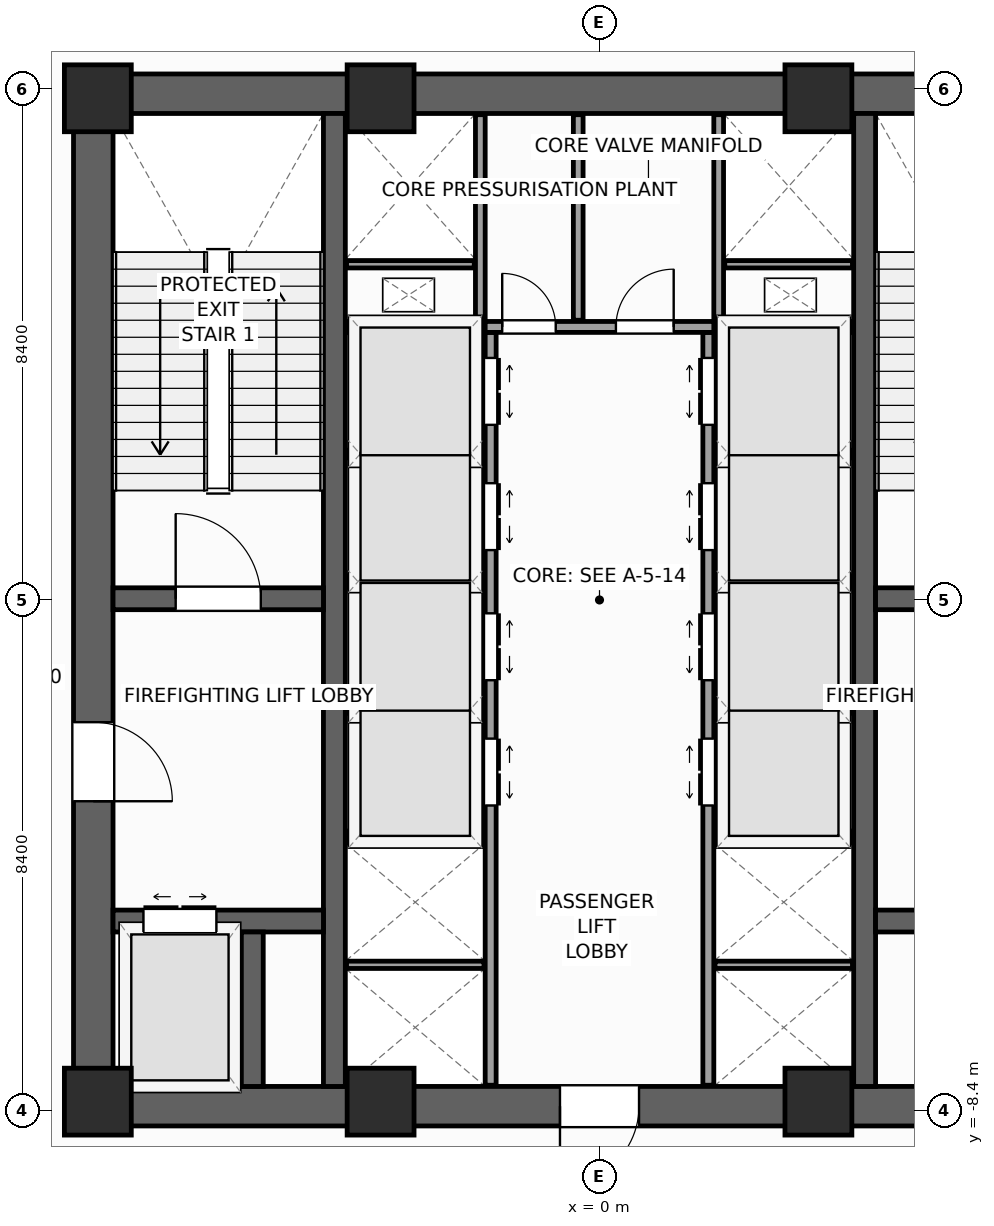
"""IFC4 building model, lengths in metres.
Left out: names, types, materials, properties, quantities, classifications, styles, units other than length and angle.
Written with IfcOpenShell. Run it as: python <this file> out.ifc"""

import sys

from ifc_helpers import new_model, si_unit, direction, frame, frame_2d, origin, origin_2d, place, context, subcontext, project, spatial, rectangle, extrude, source, transform, mapped, element, fill, save


model = new_model("IFC4")
c1 = context("Model", 3, precision=1e-05, world=origin(), true_north=direction((0.0, 1.0)))
c2 = subcontext(c1, "Body", "Model", "MODEL_VIEW")
j1 = project(units=[si_unit("LENGTHUNIT", "METRE"), si_unit("PLANEANGLEUNIT", "RADIAN")], contexts=[c1])
p1 = place(None, origin())
s1 = spatial("IfcSite", under=j1, at=p1, CompositionType="ELEMENT")
p2 = place(p1, origin())
s2 = spatial("IfcBuilding", under=s1, at=p2, CompositionType="ELEMENT")
p3 = place(p2, frame((0.0, 0.0, 139.2)))
s3 = spatial("IfcBuildingStorey", under=s2, at=p3, CompositionType="ELEMENT", Elevation=139.2)
p4 = place(p3, frame((-8.65, -8.325, 0.0), z_axis=(0.0, 0.0, 1.0), x_axis=(1.0, 0.0, 0.0)))
e1 = element("IfcWall", 1, at=p4, inside=s3, PredefinedType="SHEAR", context=c2, shape_type="SweptSolid", body=[
    extrude(rectangle(XDim=17.3, YDim=0.65, at=frame_2d((8.65, 0.0))), origin(), (0.0, 0.0, 1.0), 5.2),
])
p5 = place(p4, frame((8.0, 0.0, 0.0)))
e2 = element("IfcOpeningElement", 2, at=p5, cuts=e1, PredefinedType="OPENING", context=c2, shape_type="SweptSolid", body=[
    extrude(rectangle(XDim=1.3, YDim=2.2, at=frame_2d((0.65, 1.1))), frame((0.0, 0.335, 0.0), z_axis=(0.0, -1.0, 0.0), x_axis=(1.0, 0.0, 0.0)), (0.0, 0.0, 1.0), 0.67),
])
p6 = place(p3, frame((-8.65, 8.325, 0.0), z_axis=(0.0, 0.0, 1.0), x_axis=(1.0, 0.0, 0.0)))
e3 = element("IfcWall", 3, at=p6, inside=s3, PredefinedType="SHEAR", context=c2, shape_type="SweptSolid", body=[
    extrude(rectangle(XDim=17.3, YDim=0.65, at=frame_2d((8.65, 0.0))), origin(), (0.0, 0.0, 1.0), 5.2),
])
p7 = place(p3, frame((-8.325, -8.0, 0.0), z_axis=(0.0, 0.0, 1.0), x_axis=(0.0, 1.0, 0.0)))
e4 = element("IfcWall", 4, at=p7, inside=s3, PredefinedType="SHEAR", context=c2, shape_type="SweptSolid", body=[
    extrude(rectangle(XDim=16.0, YDim=0.65, at=frame_2d((8.0, 0.0))), origin(), (0.0, 0.0, 1.0), 5.2),
])
p8 = place(p7, frame((4.69, 0.0, 0.0)))
e5 = element("IfcOpeningElement", 5, at=p8, cuts=e4, PredefinedType="OPENING", context=c2, shape_type="SweptSolid", body=[
    extrude(rectangle(XDim=1.3, YDim=2.2, at=frame_2d((0.65, 1.1))), frame((0.0, 0.335, 0.0), z_axis=(0.0, -1.0, 0.0), x_axis=(1.0, 0.0, 0.0)), (0.0, 0.0, 1.0), 0.67),
])
for number, where, z_axis, x_axis in (
    (6, (-4.36, -8.0, 0.0), (0.0, 0.0, 1.0), (0.0, 1.0, 0.0)),
    (7, (4.36, -8.0, 0.0), (0.0, 0.0, 1.0), (0.0, 1.0, 0.0)),
):
    element("IfcWall", number, at=place(p3, frame(where, z_axis=z_axis, x_axis=x_axis)), inside=s3, PredefinedType="SHEAR", context=c2, shape_type="SweptSolid", body=[
        extrude(rectangle(XDim=16.0, YDim=0.36, at=frame_2d((8.0, 0.0))), origin(), (0.0, 0.0, 1.0), 5.2),
    ])
p9 = place(p3, frame((-8.0, 0.02, 0.0), z_axis=(0.0, 0.0, 1.0), x_axis=(1.0, 0.0, 0.0)))
e8 = element("IfcWall", 8, at=p9, inside=s3, PredefinedType="SHEAR", context=c2, shape_type="SweptSolid", body=[
    extrude(rectangle(XDim=3.46, YDim=0.36, at=frame_2d((1.73, 0.0))), origin(), (0.0, 0.0, 1.0), 5.2),
])
p10 = place(p9, frame((1.03, 0.0, 0.0)))
e9 = element("IfcOpeningElement", 9, at=p10, cuts=e8, PredefinedType="OPENING", context=c2, shape_type="SweptSolid", body=[
    extrude(rectangle(XDim=1.4, YDim=2.2, at=frame_2d((0.7, 1.1))), frame((0.0, 0.19, 0.0), z_axis=(0.0, -1.0, 0.0), x_axis=(1.0, 0.0, 0.0)), (0.0, 0.0, 1.0), 0.38),
])
p11 = place(p3, frame((4.54, 0.02, 0.0), z_axis=(0.0, 0.0, 1.0), x_axis=(1.0, 0.0, 0.0)))
e10 = element("IfcWall", 10, at=p11, inside=s3, PredefinedType="SHEAR", context=c2, shape_type="SweptSolid", body=[
    extrude(rectangle(XDim=3.46, YDim=0.36, at=frame_2d((1.73, 0.0))), origin(), (0.0, 0.0, 1.0), 5.2),
])
p12 = place(p11, frame((1.03, 0.0, 0.0)))
e11 = element("IfcOpeningElement", 11, at=p12, cuts=e10, PredefinedType="OPENING", context=c2, shape_type="SweptSolid", body=[
    extrude(rectangle(XDim=1.4, YDim=2.2, at=frame_2d((0.7, 1.1))), frame((0.0, 0.19, 0.0), z_axis=(0.0, -1.0, 0.0), x_axis=(1.0, 0.0, 0.0)), (0.0, 0.0, 1.0), 0.38),
])
p13 = place(p3, frame((-8.0, -5.28, 0.0), z_axis=(0.0, 0.0, 1.0), x_axis=(1.0, 0.0, 0.0)))
e12 = element("IfcWall", 12, at=p13, inside=s3, PredefinedType="SHEAR", context=c2, shape_type="SweptSolid", body=[
    extrude(rectangle(XDim=3.46, YDim=0.36, at=frame_2d((1.73, 0.0))), origin(), (0.0, 0.0, 1.0), 5.2),
])
p14 = place(p13, frame((0.5, 0.0, 0.0)))
e13 = element("IfcOpeningElement", 13, at=p14, cuts=e12, PredefinedType="OPENING", context=c2, shape_type="SweptSolid", body=[
    extrude(rectangle(XDim=1.2, YDim=2.25, at=frame_2d((0.6, 1.125))), frame((0.0, 0.19, 0.0), z_axis=(0.0, -1.0, 0.0), x_axis=(1.0, 0.0, 0.0)), (0.0, 0.0, 1.0), 0.38),
])
p15 = place(p3, frame((4.54, -5.28, 0.0), z_axis=(0.0, 0.0, 1.0), x_axis=(1.0, 0.0, 0.0)))
e14 = element("IfcWall", 14, at=p15, inside=s3, PredefinedType="SHEAR", context=c2, shape_type="SweptSolid", body=[
    extrude(rectangle(XDim=3.46, YDim=0.36, at=frame_2d((1.73, 0.0))), origin(), (0.0, 0.0, 1.0), 5.2),
])
p16 = place(p15, frame((1.76, 0.0, 0.0)))
e15 = element("IfcOpeningElement", 15, at=p16, cuts=e14, PredefinedType="OPENING", context=c2, shape_type="SweptSolid", body=[
    extrude(rectangle(XDim=1.2, YDim=2.25, at=frame_2d((0.6, 1.125))), frame((0.0, 0.19, 0.0), z_axis=(0.0, -1.0, 0.0), x_axis=(1.0, 0.0, 0.0)), (0.0, 0.0, 1.0), 0.38),
])
p17 = place(p3, frame((-5.71, -8.0, 0.0), z_axis=(0.0, 0.0, 1.0), x_axis=(0.0, 1.0, 0.0)))
e16 = element("IfcWall", 16, at=p17, inside=s3, PredefinedType="SHEAR", context=c2, shape_type="SweptSolid", body=[
    extrude(rectangle(XDim=2.54, YDim=0.36, at=frame_2d((1.27, 0.0))), origin(), (0.0, 0.0, 1.0), 5.2),
])
m1 = source(origin(), c2, "Body", "SweptSolid", [
    extrude(rectangle(XDim=1.1, YDim=1.1, at=origin_2d()), origin(), (0.0, 0.0, 1.0), 5.2),
])
for number, where, z_axis, x_axis in (
    (17, (-8.25, -8.25, 0.0), (0.0, 0.0, 1.0), (1.0, 0.0, 0.0)),
    (18, (-8.25, 8.25, 0.0), (0.0, 0.0, 1.0), (1.0, 0.0, 0.0)),
    (19, (-3.6, -8.25, 0.0), (0.0, 0.0, 1.0), (1.0, 0.0, 0.0)),
    (20, (3.6, -8.25, 0.0), (0.0, 0.0, 1.0), (1.0, 0.0, 0.0)),
    (21, (-3.6, 8.25, 0.0), (0.0, 0.0, 1.0), (1.0, 0.0, 0.0)),
    (22, (3.6, 8.25, 0.0), (0.0, 0.0, 1.0), (1.0, 0.0, 0.0)),
):
    element("IfcColumn", number, at=place(p3, frame(where, z_axis=z_axis, x_axis=x_axis)), inside=s3, PredefinedType="PILASTER", context=c2, shape_type="MappedRepresentation", body=[
        mapped(m1, transform((0.0, 0.0, 0.0), scale=1.0)),
    ])
p18 = place(p3, frame((-1.79, -7.98, 0.0), z_axis=(0.0, 0.0, 1.0), x_axis=(0.0, 1.0, 0.0)))
e23 = element("IfcWall", 23, at=p18, inside=s3, PredefinedType="PARTITIONING", context=c2, shape_type="SweptSolid", body=[
    extrude(rectangle(XDim=12.38, YDim=0.18, at=frame_2d((6.19, 0.0))), origin(), (0.0, 0.0, 1.0), 4.94),
])
p19 = place(p18, frame((4.6, 0.0, 0.0)))
e24 = element("IfcOpeningElement", 24, at=p19, cuts=e23, PredefinedType="OPENING", context=c2, shape_type="SweptSolid", body=[
    extrude(rectangle(XDim=1.1, YDim=2.2, at=frame_2d((0.55, 1.1))), frame((0.0, 0.1, 0.0), z_axis=(0.0, -1.0, 0.0), x_axis=(1.0, 0.0, 0.0)), (0.0, 0.0, 1.0), 0.2),
])
p20 = place(p18, frame((6.66, 0.0, 0.0)))
e25 = element("IfcOpeningElement", 25, at=p20, cuts=e23, PredefinedType="OPENING", context=c2, shape_type="SweptSolid", body=[
    extrude(rectangle(XDim=1.1, YDim=2.2, at=frame_2d((0.55, 1.1))), frame((0.0, 0.1, 0.0), z_axis=(0.0, -1.0, 0.0), x_axis=(1.0, 0.0, 0.0)), (0.0, 0.0, 1.0), 0.2),
])
p21 = place(p18, frame((8.8, 0.0, 0.0)))
e26 = element("IfcOpeningElement", 26, at=p21, cuts=e23, PredefinedType="OPENING", context=c2, shape_type="SweptSolid", body=[
    extrude(rectangle(XDim=1.1, YDim=2.2, at=frame_2d((0.55, 1.1))), frame((0.0, 0.1, 0.0), z_axis=(0.0, -1.0, 0.0), x_axis=(1.0, 0.0, 0.0)), (0.0, 0.0, 1.0), 0.2),
])
p22 = place(p18, frame((10.86, 0.0, 0.0)))
e27 = element("IfcOpeningElement", 27, at=p22, cuts=e23, PredefinedType="OPENING", context=c2, shape_type="SweptSolid", body=[
    extrude(rectangle(XDim=1.1, YDim=2.2, at=frame_2d((0.55, 1.1))), frame((0.0, 0.1, 0.0), z_axis=(0.0, -1.0, 0.0), x_axis=(1.0, 0.0, 0.0)), (0.0, 0.0, 1.0), 0.2),
])
p23 = place(p3, frame((1.79, -7.98, 0.0), z_axis=(0.0, 0.0, 1.0), x_axis=(0.0, 1.0, 0.0)))
e28 = element("IfcWall", 28, at=p23, inside=s3, PredefinedType="PARTITIONING", context=c2, shape_type="SweptSolid", body=[
    extrude(rectangle(XDim=12.38, YDim=0.18, at=frame_2d((6.19, 0.0))), origin(), (0.0, 0.0, 1.0), 4.94),
])
p24 = place(p23, frame((4.6, 0.0, 0.0)))
e29 = element("IfcOpeningElement", 29, at=p24, cuts=e28, PredefinedType="OPENING", context=c2, shape_type="SweptSolid", body=[
    extrude(rectangle(XDim=1.1, YDim=2.2, at=frame_2d((0.55, 1.1))), frame((0.0, 0.1, 0.0), z_axis=(0.0, -1.0, 0.0), x_axis=(1.0, 0.0, 0.0)), (0.0, 0.0, 1.0), 0.2),
])
p25 = place(p23, frame((6.66, 0.0, 0.0)))
e30 = element("IfcOpeningElement", 30, at=p25, cuts=e28, PredefinedType="OPENING", context=c2, shape_type="SweptSolid", body=[
    extrude(rectangle(XDim=1.1, YDim=2.2, at=frame_2d((0.55, 1.1))), frame((0.0, 0.1, 0.0), z_axis=(0.0, -1.0, 0.0), x_axis=(1.0, 0.0, 0.0)), (0.0, 0.0, 1.0), 0.2),
])
p26 = place(p23, frame((8.8, 0.0, 0.0)))
e31 = element("IfcOpeningElement", 31, at=p26, cuts=e28, PredefinedType="OPENING", context=c2, shape_type="SweptSolid", body=[
    extrude(rectangle(XDim=1.1, YDim=2.2, at=frame_2d((0.55, 1.1))), frame((0.0, 0.1, 0.0), z_axis=(0.0, -1.0, 0.0), x_axis=(1.0, 0.0, 0.0)), (0.0, 0.0, 1.0), 0.2),
])
p27 = place(p23, frame((10.86, 0.0, 0.0)))
e32 = element("IfcOpeningElement", 32, at=p27, cuts=e28, PredefinedType="OPENING", context=c2, shape_type="SweptSolid", body=[
    extrude(rectangle(XDim=1.1, YDim=2.2, at=frame_2d((0.55, 1.1))), frame((0.0, 0.1, 0.0), z_axis=(0.0, -1.0, 0.0), x_axis=(1.0, 0.0, 0.0)), (0.0, 0.0, 1.0), 0.2),
])
p28 = place(p3, frame((-1.88, 4.49, 0.0), z_axis=(0.0, 0.0, 1.0), x_axis=(1.0, 0.0, 0.0)))
e33 = element("IfcWall", 33, at=p28, inside=s3, PredefinedType="PARTITIONING", context=c2, shape_type="SweptSolid", body=[
    extrude(rectangle(XDim=3.76, YDim=0.18, at=frame_2d((1.88, 0.0))), origin(), (0.0, 0.0, 1.0), 4.94),
])
p29 = place(p28, frame((0.28, 0.0, 0.0)))
e34 = element("IfcOpeningElement", 34, at=p29, cuts=e33, PredefinedType="OPENING", context=c2, shape_type="SweptSolid", body=[
    extrude(rectangle(XDim=0.88, YDim=2.1, at=frame_2d((0.44, 1.05))), frame((0.0, 0.1, 0.0), z_axis=(0.0, -1.0, 0.0), x_axis=(1.0, 0.0, 0.0)), (0.0, 0.0, 1.0), 0.2),
])
p30 = place(p28, frame((2.15, 0.0, 0.0)))
e35 = element("IfcOpeningElement", 35, at=p30, cuts=e33, PredefinedType="OPENING", context=c2, shape_type="SweptSolid", body=[
    extrude(rectangle(XDim=0.95, YDim=2.1, at=frame_2d((0.475, 1.05))), frame((0.0, 0.1, 0.0), z_axis=(0.0, -1.0, 0.0), x_axis=(1.0, 0.0, 0.0)), (0.0, 0.0, 1.0), 0.2),
])
for number, where, z_axis, x_axis in (
    (36, (-4.17, -3.9, 0.0), (0.0, 0.0, 1.0), (1.0, 0.0, 0.0)),
    (37, (1.89, -3.9, 0.0), (0.0, 0.0, 1.0), (1.0, 0.0, 0.0)),
    (38, (-4.17, 0.3, 0.0), (0.0, 0.0, 1.0), (1.0, 0.0, 0.0)),
    (39, (1.89, 0.3, 0.0), (0.0, 0.0, 1.0), (1.0, 0.0, 0.0)),
    (40, (-4.17, 4.49, 0.0), (0.0, 0.0, 1.0), (1.0, 0.0, 0.0)),
    (41, (1.89, 4.49, 0.0), (0.0, 0.0, 1.0), (1.0, 0.0, 0.0)),
):
    element("IfcWall", number, at=place(p3, frame(where, z_axis=z_axis, x_axis=x_axis)), inside=s3, PredefinedType="PARTITIONING", context=c2, shape_type="SweptSolid", body=[
        extrude(rectangle(XDim=2.28, YDim=0.18, at=frame_2d((1.14, 0.0))), origin(), (0.0, 0.0, 1.0), 4.94),
    ])
for number, where, z_axis, x_axis in (
    (42, (-4.16, -6.0, 0.0), (0.0, 0.0, 1.0), (1.0, 0.0, 0.0)),
    (43, (1.9, -6.0, 0.0), (0.0, 0.0, 1.0), (1.0, 0.0, 0.0)),
    (44, (-4.16, -1.8, 0.0), (0.0, 0.0, 1.0), (1.0, 0.0, 0.0)),
    (45, (1.9, -1.8, 0.0), (0.0, 0.0, 1.0), (1.0, 0.0, 0.0)),
    (46, (-4.16, 2.4, 0.0), (0.0, 0.0, 1.0), (1.0, 0.0, 0.0)),
    (47, (1.9, 2.4, 0.0), (0.0, 0.0, 1.0), (1.0, 0.0, 0.0)),
):
    element("IfcWall", number, at=place(p3, frame(where, z_axis=z_axis, x_axis=x_axis)), inside=s3, PredefinedType="PARTITIONING", context=c2, shape_type="SweptSolid", body=[
        extrude(rectangle(XDim=2.26, YDim=0.12, at=frame_2d((1.13, 0.0))), origin(), (0.0, 0.0, 1.0), 4.94),
    ])
for number, where, z_axis, x_axis in (
    (48, (-1.96, 4.58, 0.0), (0.0, 0.0, 1.0), (0.0, 1.0, 0.0)),
    (49, (1.96, 4.58, 0.0), (0.0, 0.0, 1.0), (0.0, 1.0, 0.0)),
):
    element("IfcWall", number, at=place(p3, frame(where, z_axis=z_axis, x_axis=x_axis)), inside=s3, PredefinedType="PARTITIONING", context=c2, shape_type="SweptSolid", body=[
        extrude(rectangle(XDim=3.4, YDim=0.16, at=frame_2d((1.7, 0.0))), origin(), (0.0, 0.0, 1.0), 4.94),
    ])
for number, where, z_axis, x_axis in (
    (50, (-4.16, 5.52, 0.0), (0.0, 0.0, 1.0), (1.0, 0.0, 0.0)),
    (51, (2.06, 5.52, 0.0), (0.0, 0.0, 1.0), (1.0, 0.0, 0.0)),
):
    element("IfcWall", number, at=place(p3, frame(where, z_axis=z_axis, x_axis=x_axis)), inside=s3, PredefinedType="PARTITIONING", context=c2, shape_type="SweptSolid", body=[
        extrude(rectangle(XDim=2.1, YDim=0.12, at=frame_2d((1.05, 0.0))), origin(), (0.0, 0.0, 1.0), 4.94),
    ])
p31 = place(p3, frame((-0.35, 4.6, 0.0), z_axis=(0.0, 0.0, 1.0), x_axis=(0.0, 1.0, 0.0)))
e52 = element("IfcWall", 52, at=p31, inside=s3, PredefinedType="PARTITIONING", context=c2, shape_type="SweptSolid", body=[
    extrude(rectangle(XDim=3.38, YDim=0.16, at=frame_2d((1.69, 0.0))), origin(), (0.0, 0.0, 1.0), 4.94),
])
m2 = source(origin(), c2, "Body", "SweptSolid", [
    extrude(rectangle(XDim=1.4, YDim=2.2, at=frame_2d((0.7, 1.1))), frame((0.0, 0.025, 0.0), z_axis=(0.0, -1.0, 0.0), x_axis=(1.0, 0.0, 0.0)), (0.0, 0.0, 1.0), 0.05),
])
p32 = place(p10, origin())
e53 = element("IfcDoor", 53, at=p32, inside=s3, OperationType="SINGLE_SWING_LEFT", PredefinedType="DOOR", context=c2, shape_type="MappedRepresentation", body=[
    mapped(m2, transform((0.0, 0.0, 0.0), scale=1.0)),
])
fill(e9, e53)
m3 = source(origin(), c2, "Body", "SweptSolid", [
    extrude(rectangle(XDim=1.3, YDim=2.2, at=frame_2d((0.65, 1.1))), frame((0.0, 0.025, 0.0), z_axis=(0.0, -1.0, 0.0), x_axis=(1.0, 0.0, 0.0)), (0.0, 0.0, 1.0), 0.05),
])
p33 = place(p8, frame((1.3, 0.0, 0.0), z_axis=(0.0, 0.0, 1.0), x_axis=(-1.0, 0.0, 0.0)))
e54 = element("IfcDoor", 54, at=p33, inside=s3, OperationType="SINGLE_SWING_LEFT", PredefinedType="DOOR", context=c2, shape_type="MappedRepresentation", body=[
    mapped(m3, transform((0.0, 0.0, 0.0), scale=1.0)),
])
fill(e5, e54)
p34 = place(p5, frame((1.3, 0.0, 0.0), z_axis=(0.0, 0.0, 1.0), x_axis=(-1.0, 0.0, 0.0)))
e55 = element("IfcDoor", 55, at=p34, inside=s3, OperationType="SINGLE_SWING_LEFT", PredefinedType="DOOR", context=c2, shape_type="MappedRepresentation", body=[
    mapped(m3, transform((0.0, 0.0, 0.0), scale=1.0)),
])
fill(e2, e55)
m4 = source(origin(), c2, "Body", "SweptSolid", [
    extrude(rectangle(XDim=1.2, YDim=2.25, at=frame_2d((0.6, 1.125))), frame((0.0, 0.025, 0.0), z_axis=(0.0, -1.0, 0.0), x_axis=(1.0, 0.0, 0.0)), (0.0, 0.0, 1.0), 0.05),
])
p35 = place(p14, origin())
e56 = element("IfcDoor", 56, at=p35, inside=s3, OperationType="DOUBLE_DOOR_SLIDING", PredefinedType="DOOR", context=c2, shape_type="MappedRepresentation", body=[
    mapped(m4, transform((0.0, 0.0, 0.0), scale=1.0)),
])
fill(e13, e56)
m5 = source(origin(), c2, "Body", "SweptSolid", [
    extrude(rectangle(XDim=1.1, YDim=2.2, at=frame_2d((0.55, 1.1))), frame((0.0, 0.025, 0.0), z_axis=(0.0, -1.0, 0.0), x_axis=(1.0, 0.0, 0.0)), (0.0, 0.0, 1.0), 0.05),
])
p36 = place(p19, frame((1.1, 0.0, 0.0), z_axis=(0.0, 0.0, 1.0), x_axis=(-1.0, 0.0, 0.0)))
e57 = element("IfcDoor", 57, at=p36, inside=s3, OperationType="DOUBLE_DOOR_SLIDING", PredefinedType="DOOR", context=c2, shape_type="MappedRepresentation", body=[
    mapped(m5, transform((0.0, 0.0, 0.0), scale=1.0)),
])
fill(e24, e57)
p37 = place(p20, frame((1.1, 0.0, 0.0), z_axis=(0.0, 0.0, 1.0), x_axis=(-1.0, 0.0, 0.0)))
e58 = element("IfcDoor", 58, at=p37, inside=s3, OperationType="DOUBLE_DOOR_SLIDING", PredefinedType="DOOR", context=c2, shape_type="MappedRepresentation", body=[
    mapped(m5, transform((0.0, 0.0, 0.0), scale=1.0)),
])
fill(e25, e58)
p38 = place(p24, origin())
e59 = element("IfcDoor", 59, at=p38, inside=s3, OperationType="DOUBLE_DOOR_SLIDING", PredefinedType="DOOR", context=c2, shape_type="MappedRepresentation", body=[
    mapped(m5, transform((0.0, 0.0, 0.0), scale=1.0)),
])
fill(e29, e59)
p39 = place(p25, origin())
e60 = element("IfcDoor", 60, at=p39, inside=s3, OperationType="DOUBLE_DOOR_SLIDING", PredefinedType="DOOR", context=c2, shape_type="MappedRepresentation", body=[
    mapped(m5, transform((0.0, 0.0, 0.0), scale=1.0)),
])
fill(e30, e60)
p40 = place(p21, frame((1.1, 0.0, 0.0), z_axis=(0.0, 0.0, 1.0), x_axis=(-1.0, 0.0, 0.0)))
e61 = element("IfcDoor", 61, at=p40, inside=s3, OperationType="DOUBLE_DOOR_SLIDING", PredefinedType="DOOR", context=c2, shape_type="MappedRepresentation", body=[
    mapped(m5, transform((0.0, 0.0, 0.0), scale=1.0)),
])
fill(e26, e61)
p41 = place(p22, frame((1.1, 0.0, 0.0), z_axis=(0.0, 0.0, 1.0), x_axis=(-1.0, 0.0, 0.0)))
e62 = element("IfcDoor", 62, at=p41, inside=s3, OperationType="DOUBLE_DOOR_SLIDING", PredefinedType="DOOR", context=c2, shape_type="MappedRepresentation", body=[
    mapped(m5, transform((0.0, 0.0, 0.0), scale=1.0)),
])
fill(e27, e62)
p42 = place(p26, origin())
e63 = element("IfcDoor", 63, at=p42, inside=s3, OperationType="DOUBLE_DOOR_SLIDING", PredefinedType="DOOR", context=c2, shape_type="MappedRepresentation", body=[
    mapped(m5, transform((0.0, 0.0, 0.0), scale=1.0)),
])
fill(e31, e63)
p43 = place(p27, origin())
e64 = element("IfcDoor", 64, at=p43, inside=s3, OperationType="DOUBLE_DOOR_SLIDING", PredefinedType="DOOR", context=c2, shape_type="MappedRepresentation", body=[
    mapped(m5, transform((0.0, 0.0, 0.0), scale=1.0)),
])
fill(e32, e64)
m6 = source(origin(), c2, "Body", "SweptSolid", [
    extrude(rectangle(XDim=0.88, YDim=2.1, at=frame_2d((0.44, 1.05))), frame((0.0, 0.025, 0.0), z_axis=(0.0, -1.0, 0.0), x_axis=(1.0, 0.0, 0.0)), (0.0, 0.0, 1.0), 0.05),
])
p44 = place(p29, origin())
e65 = element("IfcDoor", 65, at=p44, inside=s3, OperationType="SINGLE_SWING_LEFT", PredefinedType="DOOR", context=c2, shape_type="MappedRepresentation", body=[
    mapped(m6, transform((0.0, 0.0, 0.0), scale=1.0)),
])
fill(e34, e65)
m7 = source(origin(), c2, "Body", "SweptSolid", [
    extrude(rectangle(XDim=0.95, YDim=2.1, at=frame_2d((0.475, 1.05))), frame((0.0, 0.025, 0.0), z_axis=(0.0, -1.0, 0.0), x_axis=(1.0, 0.0, 0.0)), (0.0, 0.0, 1.0), 0.05),
])
p45 = place(p30, origin())
e66 = element("IfcDoor", 66, at=p45, inside=s3, OperationType="SINGLE_SWING_RIGHT", PredefinedType="DOOR", context=c2, shape_type="MappedRepresentation", body=[
    mapped(m7, transform((0.0, 0.0, 0.0), scale=1.0)),
])
fill(e35, e66)
save(model, sys.argv[1])
